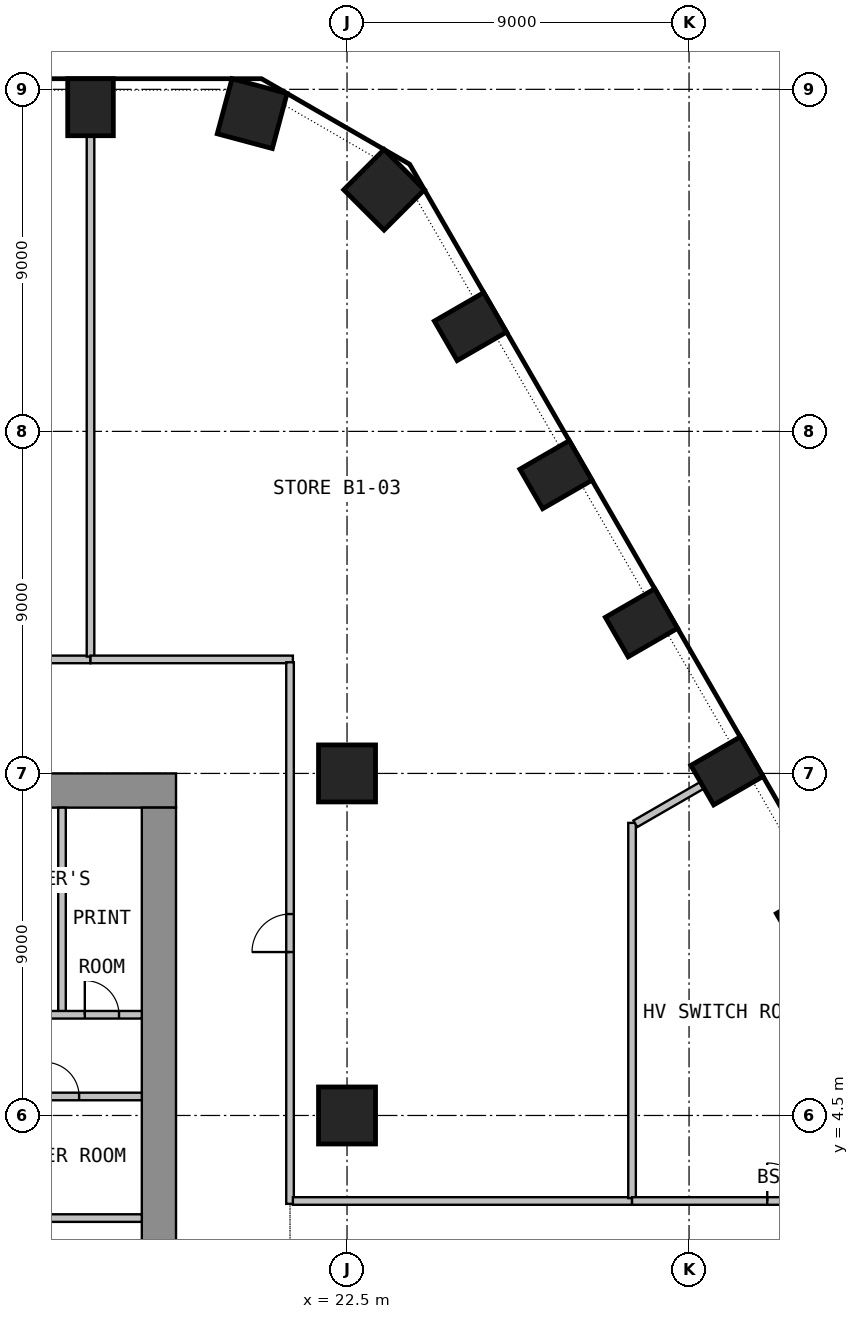
"""IFC4 building model, lengths in metres.
Left out: names, types, materials, properties, quantities, classifications, styles, units other than length and angle.
Written with IfcOpenShell. Run it as: python <this file> out.ifc"""

import sys

from ifc_helpers import new_model, si_unit, direction, frame, frame_2d, origin, origin_2d, place, context, subcontext, project, spatial, rectangle, circle, extrude, element, fill, save


model = new_model("IFC4")
c1 = context("Model", 3, precision=1e-05, world=origin(), true_north=direction((0.0, 1.0)))
c2 = subcontext(c1, "Body", "Model", "MODEL_VIEW")
j1 = project(units=[si_unit("LENGTHUNIT", "METRE"), si_unit("PLANEANGLEUNIT", "RADIAN")], contexts=[c1])
p1 = place(None, origin())
s1 = spatial("IfcSite", under=j1, at=p1, CompositionType="ELEMENT")
p2 = place(p1, origin())
s2 = spatial("IfcBuilding", under=s1, at=p2, CompositionType="ELEMENT")
p3 = place(p2, frame((0.0, 0.0, -5.0)))
s3 = spatial("IfcBuildingStorey", under=s2, at=p3, CompositionType="ELEMENT", Elevation=-5.0)
for number, where, z_axis, x_axis in (
    (1, (34.748, 9.669, 0.0), (0.0, 0.0, 1.0), (-0.5, 0.866, 0.0)),
    (2, (32.498, 13.566, 0.0), (0.0, 0.0, 1.0), (-0.5, 0.866, 0.0)),
    (3, (30.248, 17.463, 0.0), (0.0, 0.0, 1.0), (-0.5, 0.866, 0.0)),
    (4, (27.998, 21.361, 0.0), (0.0, 0.0, 1.0), (-0.5, 0.866, 0.0)),
    (5, (25.748, 25.258, 0.0), (0.0, 0.0, 1.0), (-0.5, 0.866, 0.0)),
):
    element("IfcColumn", number, at=place(p3, frame(where, z_axis=z_axis, x_axis=x_axis)), inside=s3, PredefinedType="COLUMN", context=c2, shape_type="SweptSolid", body=[
        extrude(rectangle(XDim=1.2, YDim=1.5, at=origin_2d()), origin(), (0.0, 0.0, 1.0), 4.55),
    ])
for number, where, z_axis, x_axis in (
    (6, (23.475, 28.857, 0.0), (0.0, 0.0, 1.0), (-0.707, 0.707, 0.0)),
    (7, (20.004, 30.861, 0.0), (0.0, 0.0, 1.0), (-0.966, 0.259, 0.0)),
):
    element("IfcColumn", number, at=place(p3, frame(where, z_axis=z_axis, x_axis=x_axis)), inside=s3, PredefinedType="COLUMN", context=c2, shape_type="SweptSolid", body=[
        extrude(rectangle(XDim=1.5, YDim=1.5, at=origin_2d()), origin(), (0.0, 0.0, 1.0), 4.55),
    ])
p4 = place(p3, frame((15.75, 31.03, 0.0), z_axis=(0.0, 0.0, 1.0), x_axis=(-1.0, 0.0, 0.0)))
e8 = element("IfcColumn", 8, at=p4, inside=s3, PredefinedType="COLUMN", context=c2, shape_type="SweptSolid", body=[
    extrude(rectangle(XDim=1.2, YDim=1.5, at=origin_2d()), origin(), (0.0, 0.0, 1.0), 4.55),
])
for number, where, z_axis, x_axis in (
    (9, (22.5, 4.5, 0.0), (0.0, 0.0, 1.0), (1.0, 0.0, 0.0)),
    (10, (22.5, 13.5, 0.0), (0.0, 0.0, 1.0), (1.0, 0.0, 0.0)),
):
    element("IfcColumn", number, at=place(p3, frame(where, z_axis=z_axis, x_axis=x_axis)), inside=s3, PredefinedType="COLUMN", context=c2, shape_type="SweptSolid", body=[
        extrude(circle(Radius=0.75, at=origin_2d()), origin(), (0.0, 0.0, 1.0), 4.55),
    ])
p5 = place(p3, frame((-18.0, 13.05, 0.0), z_axis=(0.0, 0.0, 1.0), x_axis=(1.0, 0.0, 0.0)))
e11 = element("IfcWall", 11, at=p5, inside=s3, PredefinedType="SHEAR", context=c2, shape_type="SweptSolid", body=[
    extrude(rectangle(XDim=36.0, YDim=0.9, at=frame_2d((18.0, 0.0))), origin(), (0.0, 0.0, 1.0), 4.55),
])
p6 = place(p5, frame((16.8, 0.0, 0.0)))
e12 = element("IfcOpeningElement", 12, at=p6, cuts=e11, PredefinedType="OPENING", context=c2, shape_type="SweptSolid", body=[
    extrude(rectangle(XDim=2.4, YDim=2.1, at=frame_2d((1.2, 1.05))), frame((0.0, 0.46, 0.0), z_axis=(0.0, -1.0, 0.0), x_axis=(1.0, 0.0, 0.0)), (0.0, 0.0, 1.0), 0.92),
])
p7 = place(p5, frame((5.55, 0.0, 0.0)))
e13 = element("IfcOpeningElement", 13, at=p7, cuts=e11, PredefinedType="OPENING", context=c2, shape_type="SweptSolid", body=[
    extrude(rectangle(XDim=1.2, YDim=2.1, at=frame_2d((0.6, 1.05))), frame((0.0, 0.46, 0.0), z_axis=(0.0, -1.0, 0.0), x_axis=(1.0, 0.0, 0.0)), (0.0, 0.0, 1.0), 0.92),
])
p8 = place(p5, frame((29.25, 0.0, 0.0)))
e14 = element("IfcOpeningElement", 14, at=p8, cuts=e11, PredefinedType="OPENING", context=c2, shape_type="SweptSolid", body=[
    extrude(rectangle(XDim=1.2, YDim=2.1, at=frame_2d((0.6, 1.05))), frame((0.0, 0.46, 0.0), z_axis=(0.0, -1.0, 0.0), x_axis=(1.0, 0.0, 0.0)), (0.0, 0.0, 1.0), 0.92),
])
p9 = place(p3, frame((17.55, -12.6, 0.0), z_axis=(0.0, 0.0, 1.0), x_axis=(0.0, 1.0, 0.0)))
e15 = element("IfcWall", 15, at=p9, inside=s3, PredefinedType="SHEAR", context=c2, shape_type="SweptSolid", body=[
    extrude(rectangle(XDim=25.2, YDim=0.9, at=frame_2d((12.6, 0.0))), origin(), (0.0, 0.0, 1.0), 4.55),
])
p10 = place(p9, frame((11.4, 0.0, 0.0)))
e16 = element("IfcOpeningElement", 16, at=p10, cuts=e15, PredefinedType="OPENING", context=c2, shape_type="SweptSolid", body=[
    extrude(rectangle(XDim=2.4, YDim=2.1, at=frame_2d((1.2, 1.05))), frame((0.0, 0.46, 0.0), z_axis=(0.0, -1.0, 0.0), x_axis=(1.0, 0.0, 0.0)), (0.0, 0.0, 1.0), 0.92),
])
p11 = place(p3, frame((15.0, 7.15, 0.0), z_axis=(0.0, 0.0, 1.0), x_axis=(0.0, 1.0, 0.0)))
e17 = element("IfcWall", 17, at=p11, inside=s3, PredefinedType="PARTITIONING", context=c2, shape_type="SweptSolid", body=[
    extrude(rectangle(XDim=5.45, YDim=0.2, at=frame_2d((2.725, 0.0))), origin(), (0.0, 0.0, 1.0), 4.55),
])
p12 = place(p3, frame((12.9, 7.15, 0.0), z_axis=(0.0, 0.0, 1.0), x_axis=(1.0, 0.0, 0.0)))
e18 = element("IfcWall", 18, at=p12, inside=s3, PredefinedType="PARTITIONING", context=c2, shape_type="SweptSolid", body=[
    extrude(rectangle(XDim=4.2, YDim=0.2, at=frame_2d((2.1, 0.0))), origin(), (0.0, 0.0, 1.0), 4.55),
])
p13 = place(p12, frame((0.6, 0.0, 0.0)))
e19 = element("IfcOpeningElement", 19, at=p13, cuts=e18, PredefinedType="OPENING", context=c2, shape_type="SweptSolid", body=[
    extrude(rectangle(XDim=0.9, YDim=2.1, at=frame_2d((0.45, 1.05))), frame((0.0, 0.11, 0.0), z_axis=(0.0, -1.0, 0.0), x_axis=(1.0, 0.0, 0.0)), (0.0, 0.0, 1.0), 0.22),
])
p14 = place(p12, frame((2.7, 0.0, 0.0)))
e20 = element("IfcOpeningElement", 20, at=p14, cuts=e18, PredefinedType="OPENING", context=c2, shape_type="SweptSolid", body=[
    extrude(rectangle(XDim=0.9, YDim=2.1, at=frame_2d((0.45, 1.05))), frame((0.0, 0.11, 0.0), z_axis=(0.0, -1.0, 0.0), x_axis=(1.0, 0.0, 0.0)), (0.0, 0.0, 1.0), 0.22),
])
p15 = place(p3, frame((12.9, 5.0, 0.0), z_axis=(0.0, 0.0, 1.0), x_axis=(1.0, 0.0, 0.0)))
e21 = element("IfcWall", 21, at=p15, inside=s3, PredefinedType="PARTITIONING", context=c2, shape_type="SweptSolid", body=[
    extrude(rectangle(XDim=4.2, YDim=0.2, at=frame_2d((2.1, 0.0))), origin(), (0.0, 0.0, 1.0), 4.55),
])
p16 = place(p15, frame((1.65, 0.0, 0.0)))
e22 = element("IfcOpeningElement", 22, at=p16, cuts=e21, PredefinedType="OPENING", context=c2, shape_type="SweptSolid", body=[
    extrude(rectangle(XDim=0.9, YDim=2.1, at=frame_2d((0.45, 1.05))), frame((0.0, 0.11, 0.0), z_axis=(0.0, -1.0, 0.0), x_axis=(1.0, 0.0, 0.0)), (0.0, 0.0, 1.0), 0.22),
])
p17 = place(p3, frame((12.9, 1.8, 0.0), z_axis=(0.0, 0.0, 1.0), x_axis=(1.0, 0.0, 0.0)))
e23 = element("IfcWall", 23, at=p17, inside=s3, PredefinedType="PARTITIONING", context=c2, shape_type="SweptSolid", body=[
    extrude(rectangle(XDim=4.2, YDim=0.2, at=frame_2d((2.1, 0.0))), origin(), (0.0, 0.0, 1.0), 4.55),
])
p18 = place(p3, frame((15.75, 16.5, 0.0), z_axis=(0.0, 0.0, 1.0), x_axis=(-1.0, 0.0, 0.0)))
e24 = element("IfcWall", 24, at=p18, inside=s3, PredefinedType="PARTITIONING", context=c2, shape_type="SweptSolid", body=[
    extrude(rectangle(XDim=13.425, YDim=0.2, at=frame_2d((6.712, 0.0))), origin(), (0.0, 0.0, 1.0), 4.55),
])
p19 = place(p3, frame((15.75, 30.26, 0.0), z_axis=(0.0, 0.0, 1.0), x_axis=(0.0, -1.0, 0.0)))
e25 = element("IfcWall", 25, at=p19, inside=s3, PredefinedType="PARTITIONING", context=c2, shape_type="SweptSolid", body=[
    extrude(rectangle(XDim=13.685, YDim=0.2, at=frame_2d((6.842, 0.0))), origin(), (0.0, 0.0, 1.0), 4.55),
])
p20 = place(p3, frame((21.075, 16.5, 0.0), z_axis=(0.0, 0.0, 1.0), x_axis=(-1.0, 0.0, 0.0)))
e26 = element("IfcWall", 26, at=p20, inside=s3, PredefinedType="PARTITIONING", context=c2, shape_type="SweptSolid", body=[
    extrude(rectangle(XDim=5.325, YDim=0.2, at=frame_2d((2.663, 0.0))), origin(), (0.0, 0.0, 1.0), 4.55),
])
p21 = place(p3, frame((21.0, 2.175, 0.0), z_axis=(0.0, 0.0, 1.0), x_axis=(0.0, 1.0, 0.0)))
e27 = element("IfcWall", 27, at=p21, inside=s3, PredefinedType="PARTITIONING", context=c2, shape_type="SweptSolid", body=[
    extrude(rectangle(XDim=14.25, YDim=0.2, at=frame_2d((7.125, 0.0))), origin(), (0.0, 0.0, 1.0), 4.55),
])
p22 = place(p21, frame((6.625, 0.0, 0.0)))
e28 = element("IfcOpeningElement", 28, at=p22, cuts=e27, PredefinedType="OPENING", context=c2, shape_type="SweptSolid", body=[
    extrude(rectangle(XDim=1.0, YDim=2.1, at=frame_2d((0.5, 1.05))), frame((0.0, 0.11, 0.0), z_axis=(0.0, -1.0, 0.0), x_axis=(1.0, 0.0, 0.0)), (0.0, 0.0, 1.0), 0.22),
])
p23 = place(p3, frame((21.075, 2.25, 0.0), z_axis=(0.0, 0.0, 1.0), x_axis=(1.0, 0.0, 0.0)))
e29 = element("IfcWall", 29, at=p23, inside=s3, PredefinedType="PARTITIONING", context=c2, shape_type="SweptSolid", body=[
    extrude(rectangle(XDim=8.925, YDim=0.2, at=frame_2d((4.462, 0.0))), origin(), (0.0, 0.0, 1.0), 4.55),
])
p24 = place(p3, frame((30.0, 12.199, 0.0), z_axis=(0.0, 0.0, 1.0), x_axis=(0.0, -1.0, 0.0)))
e30 = element("IfcWall", 30, at=p24, inside=s3, PredefinedType="PARTITIONING", context=c2, shape_type="SweptSolid", body=[
    extrude(rectangle(XDim=9.874, YDim=0.2, at=frame_2d((4.937, 0.0))), origin(), (0.0, 0.0, 1.0), 4.55),
])
p25 = place(p3, frame((30.0, 2.25, 0.0), z_axis=(0.0, 0.0, 1.0), x_axis=(1.0, 0.0, 0.0)))
e31 = element("IfcWall", 31, at=p25, inside=s3, PredefinedType="PARTITIONING", context=c2, shape_type="SweptSolid", body=[
    extrude(rectangle(XDim=8.115, YDim=0.2, at=frame_2d((4.058, 0.0))), origin(), (0.0, 0.0, 1.0), 4.55),
])
p26 = place(p25, frame((3.558, 0.0, 0.0)))
e32 = element("IfcOpeningElement", 32, at=p26, cuts=e31, PredefinedType="OPENING", context=c2, shape_type="SweptSolid", body=[
    extrude(rectangle(XDim=1.0, YDim=2.1, at=frame_2d((0.5, 1.05))), frame((0.0, 0.11, 0.0), z_axis=(0.0, -1.0, 0.0), x_axis=(1.0, 0.0, 0.0)), (0.0, 0.0, 1.0), 0.22),
])
p27 = place(p3, frame((31.831, 13.181, 0.0), z_axis=(0.0, 0.0, 1.0), x_axis=(-0.86600389892, -0.500037245667, 0.0)))
e33 = element("IfcWall", 33, at=p27, inside=s3, PredefinedType="PARTITIONING", context=c2, shape_type="SweptSolid", body=[
    extrude(rectangle(XDim=2.014, YDim=0.2, at=frame_2d((1.007, 0.0))), origin(), (0.0, 0.0, 1.0), 4.55),
])
p28 = place(p14, origin())
e34 = element("IfcDoor", 34, at=p28, inside=s3, OperationType="SINGLE_SWING_LEFT", PredefinedType="DOOR", context=c2, shape_type="SweptSolid", body=[
    extrude(rectangle(XDim=0.9, YDim=2.1, at=frame_2d((0.45, 1.05))), frame((0.0, 0.025, 0.0), z_axis=(0.0, -1.0, 0.0), x_axis=(1.0, 0.0, 0.0)), (0.0, 0.0, 1.0), 0.05),
])
fill(e20, e34)
p29 = place(p16, origin())
e35 = element("IfcDoor", 35, at=p29, inside=s3, OperationType="SINGLE_SWING_LEFT", PredefinedType="DOOR", context=c2, shape_type="SweptSolid", body=[
    extrude(rectangle(XDim=0.9, YDim=2.1, at=frame_2d((0.45, 1.05))), frame((0.0, 0.025, 0.0), z_axis=(0.0, -1.0, 0.0), x_axis=(1.0, 0.0, 0.0)), (0.0, 0.0, 1.0), 0.05),
])
fill(e22, e35)
p30 = place(p22, origin())
e36 = element("IfcDoor", 36, at=p30, inside=s3, OperationType="SINGLE_SWING_LEFT", PredefinedType="DOOR", context=c2, shape_type="SweptSolid", body=[
    extrude(rectangle(XDim=1.0, YDim=2.1, at=frame_2d((0.5, 1.05))), frame((0.0, 0.025, 0.0), z_axis=(0.0, -1.0, 0.0), x_axis=(1.0, 0.0, 0.0)), (0.0, 0.0, 1.0), 0.05),
])
fill(e28, e36)
p31 = place(p26, origin())
e37 = element("IfcDoor", 37, at=p31, inside=s3, OperationType="SINGLE_SWING_LEFT", PredefinedType="DOOR", context=c2, shape_type="SweptSolid", body=[
    extrude(rectangle(XDim=1.0, YDim=2.1, at=frame_2d((0.5, 1.05))), frame((0.0, 0.025, 0.0), z_axis=(0.0, -1.0, 0.0), x_axis=(1.0, 0.0, 0.0)), (0.0, 0.0, 1.0), 0.05),
])
fill(e32, e37)
save(model, sys.argv[1])
